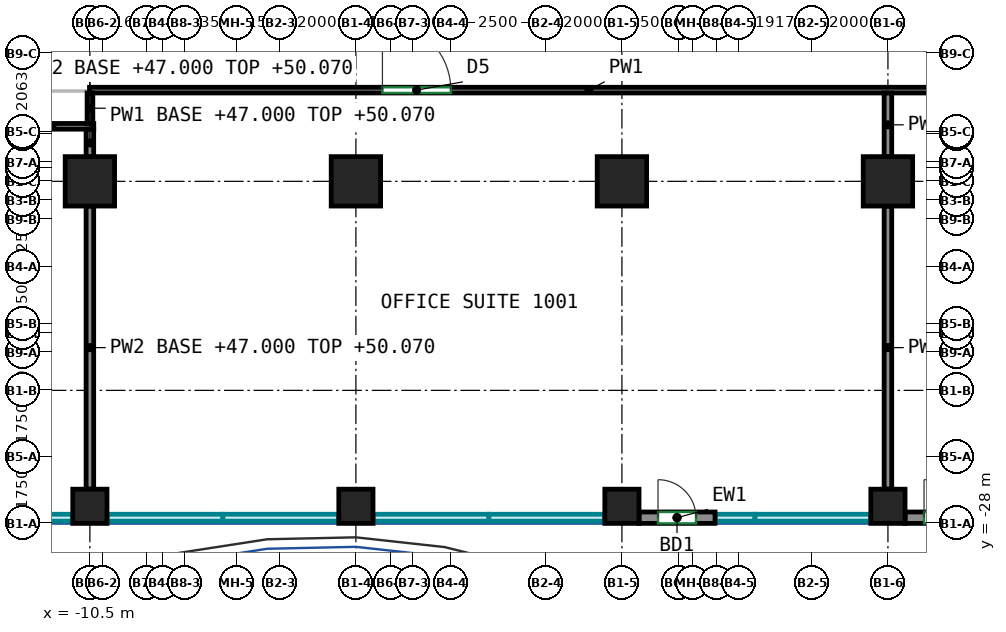
"""IFC4 building model, lengths in metres.
Left out: names, types, materials, properties, quantities, classifications, styles, units other than length and angle.
Written with IfcOpenShell. Run it as: python <this file> out.ifc"""

import sys

from ifc_helpers import new_model, si_unit, direction, frame, frame_2d, origin, origin_2d, place, context, subcontext, project, spatial, rectangle, extrude, source, transform, mapped, element, fill, save


model = new_model("IFC4")
c1 = context("Model", 3, precision=1e-05, world=origin(), true_north=direction((0.0, 1.0)))
c2 = subcontext(c1, "Body", "Model", "MODEL_VIEW")
j1 = project(units=[si_unit("LENGTHUNIT", "METRE"), si_unit("PLANEANGLEUNIT", "RADIAN")], contexts=[c1])
p1 = place(None, origin())
s1 = spatial("IfcSite", under=j1, at=p1, CompositionType="ELEMENT")
p2 = place(p1, origin())
s2 = spatial("IfcBuilding", under=s1, at=p2, CompositionType="ELEMENT")
p3 = place(p2, frame((0.0, 0.0, 47.0)))
s3 = spatial("IfcBuildingStorey", under=s2, at=p3, CompositionType="ELEMENT", Elevation=47.0)
m1 = source(origin(), c2, "Body", "SweptSolid", [
    extrude(rectangle(XDim=0.9, YDim=0.9, at=origin_2d()), origin(), (0.0, 0.0, 1.0), 3.72),
])
p4 = place(p3, frame((-10.5, -27.55, 0.0), z_axis=(0.0, 0.0, 1.0), x_axis=(1.0, 0.0, 0.0)))
e1 = element("IfcColumn", 1, at=p4, inside=s3, PredefinedType="COLUMN", context=c2, shape_type="MappedRepresentation", body=[
    mapped(m1, transform((0.0, 0.0, 0.0))),
])
m2 = source(origin(), c2, "Body", "SweptSolid", [
    extrude(rectangle(XDim=1.3, YDim=1.3, at=origin_2d()), origin(), (0.0, 0.0, 1.0), 3.72),
])
p5 = place(p3, frame((-10.5, -19.0, 0.0), z_axis=(0.0, 0.0, 1.0), x_axis=(1.0, 0.0, 0.0)))
e2 = element("IfcColumn", 2, at=p5, inside=s3, PredefinedType="COLUMN", context=c2, shape_type="MappedRepresentation", body=[
    mapped(m2, transform((0.0, 0.0, 0.0))),
])
p6 = place(p3, frame((-3.5, -27.55, 0.0), z_axis=(0.0, 0.0, 1.0), x_axis=(1.0, 0.0, 0.0)))
e3 = element("IfcColumn", 3, at=p6, inside=s3, PredefinedType="COLUMN", context=c2, shape_type="MappedRepresentation", body=[
    mapped(m1, transform((0.0, 0.0, 0.0))),
])
p7 = place(p3, frame((-3.5, -19.0, 0.0), z_axis=(0.0, 0.0, 1.0), x_axis=(1.0, 0.0, 0.0)))
e4 = element("IfcColumn", 4, at=p7, inside=s3, PredefinedType="COLUMN", context=c2, shape_type="MappedRepresentation", body=[
    mapped(m2, transform((0.0, 0.0, 0.0))),
])
p8 = place(p3, frame((3.5, -27.55, 0.0), z_axis=(0.0, 0.0, 1.0), x_axis=(1.0, 0.0, 0.0)))
e5 = element("IfcColumn", 5, at=p8, inside=s3, PredefinedType="COLUMN", context=c2, shape_type="MappedRepresentation", body=[
    mapped(m1, transform((0.0, 0.0, 0.0))),
])
p9 = place(p3, frame((3.5, -19.0, 0.0), z_axis=(0.0, 0.0, 1.0), x_axis=(1.0, 0.0, 0.0)))
e6 = element("IfcColumn", 6, at=p9, inside=s3, PredefinedType="COLUMN", context=c2, shape_type="MappedRepresentation", body=[
    mapped(m2, transform((0.0, 0.0, 0.0))),
])
p10 = place(p3, frame((10.5, -27.55, 0.0), z_axis=(0.0, 0.0, 1.0), x_axis=(1.0, 0.0, 0.0)))
e7 = element("IfcColumn", 7, at=p10, inside=s3, PredefinedType="COLUMN", context=c2, shape_type="MappedRepresentation", body=[
    mapped(m1, transform((0.0, 0.0, 0.0))),
])
p11 = place(p3, frame((10.5, -19.0, 0.0), z_axis=(0.0, 0.0, 1.0), x_axis=(1.0, 0.0, 0.0)))
e8 = element("IfcColumn", 8, at=p11, inside=s3, PredefinedType="COLUMN", context=c2, shape_type="MappedRepresentation", body=[
    mapped(m2, transform((0.0, 0.0, 0.0))),
])
m3 = source(origin(), c2, "Body", "SweptSolid", [
    extrude(rectangle(XDim=2.0, YDim=0.3, at=frame_2d((1.0, 0.0))), origin(), (0.0, 0.0, 1.0), 3.72),
])
p12 = place(p3, frame((3.95, -27.85, 0.0), z_axis=(0.0, 0.0, 1.0), x_axis=(1.0, 0.0, 0.0)))
e9 = element("IfcWall", 9, at=p12, inside=s3, PredefinedType="SOLIDWALL", context=c2, shape_type="MappedRepresentation", body=[
    mapped(m3, transform((0.0, 0.0, 0.0))),
])
p13 = place(p12, frame((0.5, 0.0, 0.0)))
e10 = element("IfcOpeningElement", 10, at=p13, cuts=e9, PredefinedType="OPENING", context=c2, shape_type="SweptSolid", body=[
    extrude(rectangle(XDim=1.0, YDim=2.1, at=frame_2d((0.5, 1.05))), frame((0.0, 0.16, 0.0), z_axis=(0.0, -1.0, 0.0), x_axis=(1.0, 0.0, 0.0)), (0.0, 0.0, 1.0), 0.32),
])
p14 = place(p3, frame((10.95, -27.85, 0.0), z_axis=(0.0, 0.0, 1.0), x_axis=(1.0, 0.0, 0.0)))
e11 = element("IfcWall", 11, at=p14, inside=s3, PredefinedType="SOLIDWALL", context=c2, shape_type="MappedRepresentation", body=[
    mapped(m3, transform((0.0, 0.0, 0.0))),
])
p15 = place(p14, frame((0.5, 0.0, 0.0)))
e12 = element("IfcOpeningElement", 12, at=p15, cuts=e11, PredefinedType="OPENING", context=c2, shape_type="SweptSolid", body=[
    extrude(rectangle(XDim=1.0, YDim=2.1, at=frame_2d((0.5, 1.05))), frame((0.0, 0.16, 0.0), z_axis=(0.0, -1.0, 0.0), x_axis=(1.0, 0.0, 0.0)), (0.0, 0.0, 1.0), 0.32),
])
p16 = place(p3, frame((-12.602, -17.552, 0.0), z_axis=(0.0, 0.0, 1.0), x_axis=(1.0, 0.0, 0.0)))
e13 = element("IfcWall", 13, at=p16, inside=s3, PredefinedType="PARTITIONING", context=c2, shape_type="SweptSolid", body=[
    extrude(rectangle(XDim=2.204, YDim=0.15, at=frame_2d((1.102, 0.0))), origin(), (0.0, 0.0, 1.0), 3.72),
])
p17 = place(p3, frame((-10.51, -16.6, 0.0), z_axis=(0.0, 0.0, 1.0), x_axis=(1.0, 0.0, 0.0)))
e14 = element("IfcWall", 14, at=p17, inside=s3, PredefinedType="PARTITIONING", context=c2, shape_type="SweptSolid", body=[
    extrude(rectangle(XDim=26.285, YDim=0.15, at=frame_2d((13.143, 0.0))), origin(), (0.0, 0.0, 1.0), 3.72),
])
p18 = place(p17, frame((7.708, 0.0, 0.0)))
e15 = element("IfcOpeningElement", 15, at=p18, cuts=e14, PredefinedType="OPENING", context=c2, shape_type="SweptSolid", body=[
    extrude(rectangle(XDim=1.8, YDim=2.1, at=frame_2d((0.9, 1.05))), frame((0.0, 0.085, 0.0), z_axis=(0.0, -1.0, 0.0), x_axis=(1.0, 0.0, 0.0)), (0.0, 0.0, 1.0), 0.17),
])
p19 = place(p3, frame((-10.498, -17.477, 0.0), z_axis=(0.0, 0.0, 1.0), x_axis=(0.0, 1.0, 0.0)))
e16 = element("IfcWall", 16, at=p19, inside=s3, PredefinedType="PARTITIONING", context=c2, shape_type="SweptSolid", body=[
    extrude(rectangle(XDim=0.802, YDim=0.15, at=frame_2d((0.401, 0.0))), origin(), (0.0, 0.0, 1.0), 3.07),
])
p20 = place(p3, frame((-10.5, -18.35, 0.0), z_axis=(0.0, 0.0, 1.0), x_axis=(0.0, 1.0, 0.0)))
e17 = element("IfcWall", 17, at=p20, inside=s3, PredefinedType="PARTITIONING", context=c2, shape_type="SweptSolid", body=[
    extrude(rectangle(XDim=0.723, YDim=0.2, at=frame_2d((0.362, 0.0))), origin(), (0.0, 0.0, 1.0), 3.07),
])
p21 = place(p3, frame((-10.5, -27.1, 0.0), z_axis=(0.0, 0.0, 1.0), x_axis=(0.0, 1.0, 0.0)))
e18 = element("IfcWall", 18, at=p21, inside=s3, PredefinedType="PARTITIONING", context=c2, shape_type="SweptSolid", body=[
    extrude(rectangle(XDim=7.45, YDim=0.2, at=frame_2d((3.725, 0.0))), origin(), (0.0, 0.0, 1.0), 3.07),
])
p22 = place(p3, frame((10.5, -18.35, 0.0), z_axis=(0.0, 0.0, 1.0), x_axis=(0.0, 1.0, 0.0)))
e19 = element("IfcWall", 19, at=p22, inside=s3, PredefinedType="PARTITIONING", context=c2, shape_type="SweptSolid", body=[
    extrude(rectangle(XDim=1.674, YDim=0.2, at=frame_2d((0.837, 0.0))), origin(), (0.0, 0.0, 1.0), 3.07),
])
p23 = place(p3, frame((10.5, -27.1, 0.0), z_axis=(0.0, 0.0, 1.0), x_axis=(0.0, 1.0, 0.0)))
e20 = element("IfcWall", 20, at=p23, inside=s3, PredefinedType="PARTITIONING", context=c2, shape_type="SweptSolid", body=[
    extrude(rectangle(XDim=7.45, YDim=0.2, at=frame_2d((3.725, 0.0))), origin(), (0.0, 0.0, 1.0), 3.07),
])
p24 = place(p13, origin())
e21 = element("IfcDoor", 21, at=p24, inside=s3, OperationType="SINGLE_SWING_LEFT", PredefinedType="DOOR", context=c2, shape_type="SweptSolid", body=[
    extrude(rectangle(XDim=1.0, YDim=2.1, at=frame_2d((0.5, 1.05))), frame((0.0, 0.025, 0.0), z_axis=(0.0, -1.0, 0.0), x_axis=(1.0, 0.0, 0.0)), (0.0, 0.0, 1.0), 0.05),
])
fill(e10, e21)
p25 = place(p15, origin())
e22 = element("IfcDoor", 22, at=p25, inside=s3, OperationType="SINGLE_SWING_LEFT", PredefinedType="DOOR", context=c2, shape_type="SweptSolid", body=[
    extrude(rectangle(XDim=1.0, YDim=2.1, at=frame_2d((0.5, 1.05))), frame((0.0, 0.025, 0.0), z_axis=(0.0, -1.0, 0.0), x_axis=(1.0, 0.0, 0.0)), (0.0, 0.0, 1.0), 0.05),
])
fill(e12, e22)
p26 = place(p18, origin())
e23 = element("IfcDoor", 23, at=p26, inside=s3, OperationType="DOUBLE_DOOR_SINGLE_SWING", PredefinedType="DOOR", context=c2, shape_type="SweptSolid", body=[
    extrude(rectangle(XDim=1.8, YDim=2.1, at=frame_2d((0.9, 1.05))), frame((0.0, 0.025, 0.0), z_axis=(0.0, -1.0, 0.0), x_axis=(1.0, 0.0, 0.0)), (0.0, 0.0, 1.0), 0.05),
])
fill(e15, e23)
save(model, sys.argv[1])
